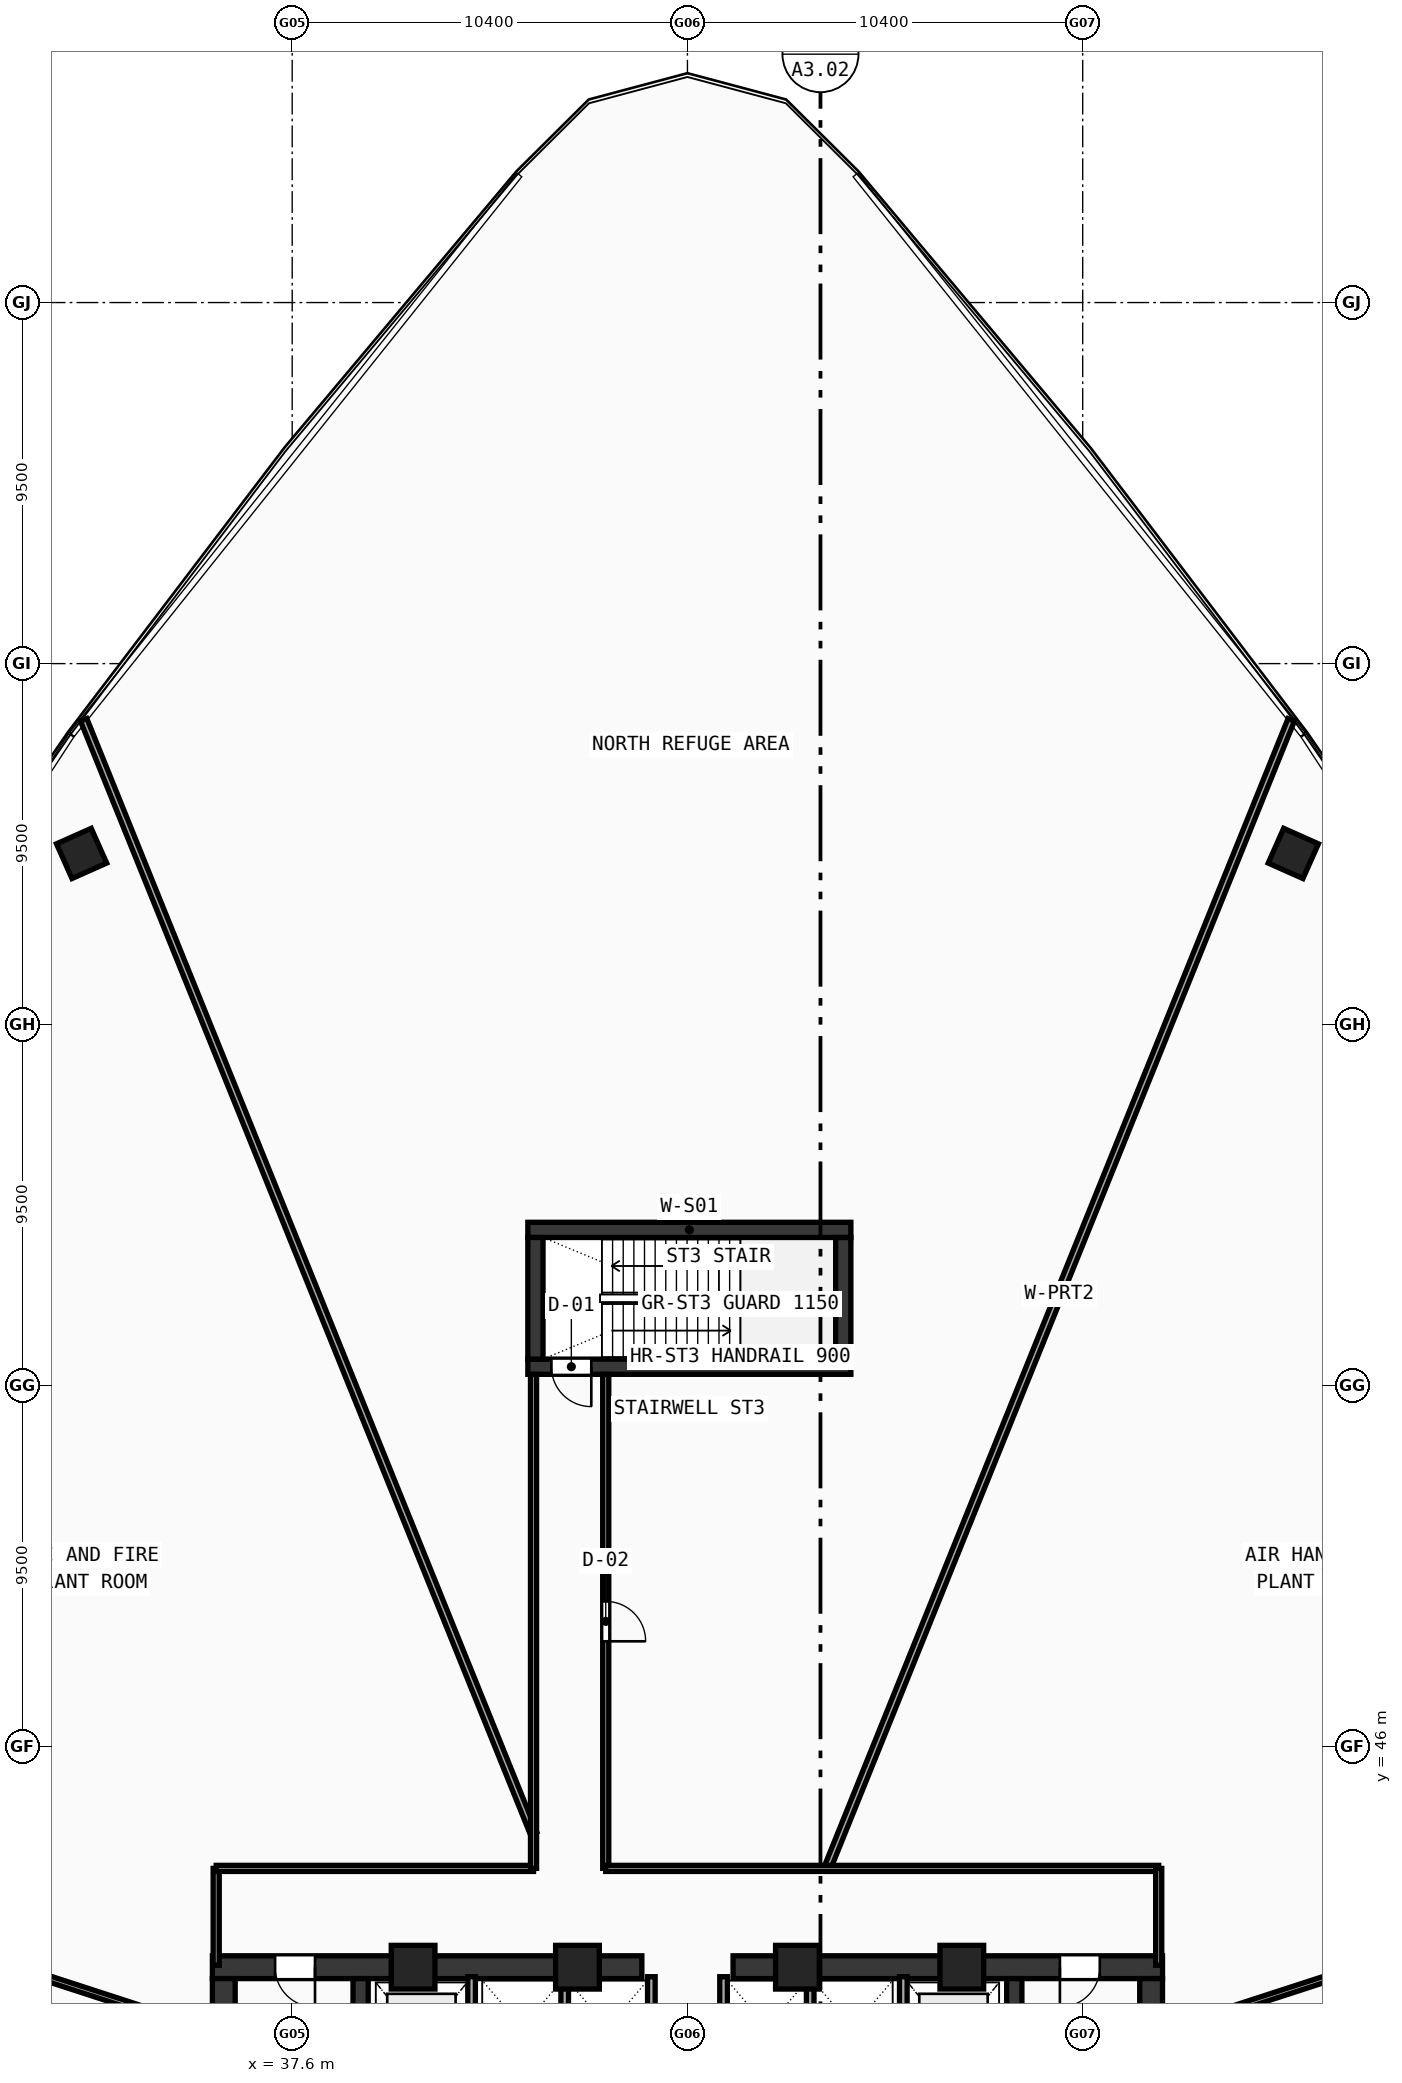
"""IFC4 building model, lengths in metres.
Left out: names, types, materials, properties, quantities, classifications, styles, units other than length and angle.
Written with IfcOpenShell. Run it as: python <this file> out.ifc"""

import sys

from ifc_helpers import new_model, si_unit, direction, frame, frame_2d, origin, origin_with_axes, origin_2d, place, context, subcontext, project, spatial, rectangle, hollow_rectangle, extrude, source, transform, mapped, element, fill, save


model = new_model("IFC4")
c1 = context("Model", 3, precision=1e-05, world=origin(), true_north=direction((0.0, 1.0)))
c2 = subcontext(c1, "Body", "Model", "MODEL_VIEW")
j1 = project(units=[si_unit("LENGTHUNIT", "METRE"), si_unit("PLANEANGLEUNIT", "RADIAN")], contexts=[c1])
p1 = place(None, origin())
s1 = spatial("IfcSite", under=j1, at=p1, CompositionType="ELEMENT")
p2 = place(p1, origin())
s2 = spatial("IfcBuilding", under=s1, at=p2, CompositionType="ELEMENT")
p3 = place(p2, frame((0.0, 0.0, 76.38)))
s3 = spatial("IfcBuildingStorey", under=s2, at=p3, CompositionType="ELEMENT", Elevation=76.38)
p4 = place(p3, frame((35.5, 40.2, 0.0), z_axis=(0.0, 0.0, 1.0), x_axis=(1.0, 0.0, 0.0)))
e1 = element("IfcWall", 1, at=p4, inside=s3, PredefinedType="SHEAR", context=c2, shape_type="SweptSolid", body=[
    extrude(rectangle(XDim=11.3, YDim=0.6, at=frame_2d((5.65, 0.0))), origin(), (0.0, 0.0, 1.0), 4.54),
])
p5 = place(p4, frame((1.65, 0.0, 0.0)))
e2 = element("IfcOpeningElement", 2, at=p5, cuts=e1, PredefinedType="OPENING", context=c2, shape_type="SweptSolid", body=[
    extrude(rectangle(XDim=1.05, YDim=2.1, at=frame_2d((0.525, 1.05))), frame((0.0, 0.31, 0.0), z_axis=(0.0, -1.0, 0.0), x_axis=(1.0, 0.0, 0.0)), (0.0, 0.0, 1.0), 0.62),
])
p6 = place(p3, frame((49.2, 40.2, 0.0), z_axis=(0.0, 0.0, 1.0), x_axis=(1.0, 0.0, 0.0)))
e3 = element("IfcWall", 3, at=p6, inside=s3, PredefinedType="SHEAR", context=c2, shape_type="SweptSolid", body=[
    extrude(rectangle(XDim=11.3, YDim=0.6, at=frame_2d((5.65, 0.0))), origin(), (0.0, 0.0, 1.0), 4.54),
])
p7 = place(p6, frame((8.6, 0.0, 0.0)))
e4 = element("IfcOpeningElement", 4, at=p7, cuts=e3, PredefinedType="OPENING", context=c2, shape_type="SweptSolid", body=[
    extrude(rectangle(XDim=1.05, YDim=2.1, at=frame_2d((0.525, 1.05))), frame((0.0, 0.31, 0.0), z_axis=(0.0, -1.0, 0.0), x_axis=(1.0, 0.0, 0.0)), (0.0, 0.0, 1.0), 0.62),
])
for number, where, z_axis, x_axis in (
    (5, (35.8, 27.8, 0.0), (0.0, 0.0, 1.0), (0.0, 1.0, 0.0)),
    (6, (60.2, 27.8, 0.0), (0.0, 0.0, 1.0), (0.0, 1.0, 0.0)),
):
    element("IfcWall", number, at=place(p3, frame(where, z_axis=z_axis, x_axis=x_axis)), inside=s3, PredefinedType="SHEAR", context=c2, shape_type="SweptSolid", body=[
        extrude(rectangle(XDim=12.1, YDim=0.6, at=frame_2d((6.05, 0.0))), origin(), (0.0, 0.0, 1.0), 4.54),
    ])
p8 = place(p3, frame((39.4, 27.8, 0.0), z_axis=(0.0, 0.0, 1.0), x_axis=(0.0, 1.0, 0.0)))
e7 = element("IfcWall", 7, at=p8, inside=s3, PredefinedType="SHEAR", context=c2, shape_type="SweptSolid", body=[
    extrude(rectangle(XDim=12.1, YDim=0.4, at=frame_2d((6.05, 0.0))), origin(), (0.0, 0.0, 1.0), 4.54),
])
p9 = place(p8, frame((9.95, 0.0, 0.0)))
e8 = element("IfcOpeningElement", 8, at=p9, cuts=e7, PredefinedType="OPENING", context=c2, shape_type="SweptSolid", body=[
    extrude(rectangle(XDim=1.1, YDim=2.1, at=frame_2d((0.55, 1.05))), frame((0.0, 0.21, 0.0), z_axis=(0.0, -1.0, 0.0), x_axis=(1.0, 0.0, 0.0)), (0.0, 0.0, 1.0), 0.42),
])
p10 = place(p3, frame((56.6, 27.8, 0.0), z_axis=(0.0, 0.0, 1.0), x_axis=(0.0, 1.0, 0.0)))
e9 = element("IfcWall", 9, at=p10, inside=s3, PredefinedType="SHEAR", context=c2, shape_type="SweptSolid", body=[
    extrude(rectangle(XDim=12.1, YDim=0.4, at=frame_2d((6.05, 0.0))), origin(), (0.0, 0.0, 1.0), 4.54),
])
p11 = place(p10, frame((9.95, 0.0, 0.0)))
e10 = element("IfcOpeningElement", 10, at=p11, cuts=e9, PredefinedType="OPENING", context=c2, shape_type="SweptSolid", body=[
    extrude(rectangle(XDim=1.1, YDim=2.1, at=frame_2d((0.55, 1.05))), frame((0.0, 0.21, 0.0), z_axis=(0.0, -1.0, 0.0), x_axis=(1.0, 0.0, 0.0)), (0.0, 0.0, 1.0), 0.42),
])
p12 = place(p3, frame((43.8, 59.6, 0.0), z_axis=(0.0, 0.0, 1.0), x_axis=(1.0, 0.0, 0.0)))
e11 = element("IfcWall", 11, at=p12, inside=s3, PredefinedType="SHEAR", context=c2, shape_type="SweptSolid", body=[
    extrude(rectangle(XDim=8.5, YDim=0.4, at=frame_2d((4.25, 0.0))), origin(), (0.0, 0.0, 1.0), 4.54),
])
p13 = place(p3, frame((43.8, 56.0, 0.0), z_axis=(0.0, 0.0, 1.0), x_axis=(1.0, 0.0, 0.0)))
e12 = element("IfcWall", 12, at=p13, inside=s3, PredefinedType="SHEAR", context=c2, shape_type="SweptSolid", body=[
    extrude(rectangle(XDim=8.5, YDim=0.4, at=frame_2d((4.25, 0.0))), origin(), (0.0, 0.0, 1.0), 4.54),
])
p14 = place(p13, frame((0.62, 0.0, 0.0)))
e13 = element("IfcOpeningElement", 13, at=p14, cuts=e12, PredefinedType="OPENING", context=c2, shape_type="SweptSolid", body=[
    extrude(rectangle(XDim=1.05, YDim=2.1, at=frame_2d((0.525, 1.05))), frame((0.0, 0.21, 0.0), z_axis=(0.0, -1.0, 0.0), x_axis=(1.0, 0.0, 0.0)), (0.0, 0.0, 1.0), 0.42),
])
for number, where, z_axis, x_axis in (
    (14, (44.0, 56.2, 0.0), (0.0, 0.0, 1.0), (0.0, 1.0, 0.0)),
    (15, (52.1, 56.2, 0.0), (0.0, 0.0, 1.0), (0.0, 1.0, 0.0)),
):
    element("IfcWall", number, at=place(p3, frame(where, z_axis=z_axis, x_axis=x_axis)), inside=s3, PredefinedType="SHEAR", context=c2, shape_type="SweptSolid", body=[
        extrude(rectangle(XDim=3.2, YDim=0.4, at=frame_2d((1.6, 0.0))), origin(), (0.0, 0.0, 1.0), 4.54),
    ])
m1 = source(origin(), c2, "Body", "SweptSolid", [
    extrude(hollow_rectangle(XDim=1.15, YDim=1.15, WallThickness=0.048, at=origin_2d()), origin(), (0.0, 0.0, 1.0), 4.82),
])
for number, where, z_axis, x_axis in (
    (16, (55.219, 40.2, -0.28), (0.0, 0.0, 1.0), (1.0, 0.0, 0.0)),
    (17, (50.894, 40.2, -0.28), (0.0, 0.0, 1.0), (1.0, 0.0, 0.0)),
    (18, (45.106, 40.2, -0.28), (0.0, 0.0, 1.0), (1.0, 0.0, 0.0)),
    (19, (40.781, 40.2, -0.28), (0.0, 0.0, 1.0), (1.0, 0.0, 0.0)),
):
    element("IfcColumn", number, at=place(p3, frame(where, z_axis=z_axis, x_axis=x_axis)), inside=s3, PredefinedType="COLUMN", context=c2, shape_type="MappedRepresentation", body=[
        mapped(m1, transform((0.0, 0.0, 0.0), scale=1.0)),
    ])
m2 = source(origin(), c2, "Body", "SweptSolid", [
    extrude(hollow_rectangle(XDim=1.0, YDim=1.0, WallThickness=0.042, at=origin_2d()), origin(), (0.0, 0.0, 1.0), 4.82),
])
for number, where, z_axis, x_axis in (
    (20, (63.941, 69.505, -0.28), (0.0, 0.0, 1.0), (-0.914, 0.407, 0.0)),
    (21, (32.059, 69.505, -0.28), (0.0, 0.0, 1.0), (-0.914, -0.407, 0.0)),
):
    element("IfcColumn", number, at=place(p3, frame(where, z_axis=z_axis, x_axis=x_axis)), inside=s3, PredefinedType="COLUMN", context=c2, shape_type="MappedRepresentation", body=[
        mapped(m2, transform((0.0, 0.0, 0.0), scale=1.0)),
    ])
p15 = place(p3, frame((42.32, 33.5, 0.0), z_axis=(0.0, 0.0, 1.0), x_axis=(0.0, 1.0, 0.0)))
e22 = element("IfcWall", 22, at=p15, inside=s3, PredefinedType="SOLIDWALL", context=c2, shape_type="SweptSolid", body=[
    extrude(rectangle(XDim=6.45, YDim=0.2, at=frame_2d((3.225, 0.0))), origin(), (0.0, 0.0, 1.0), 4.54),
])
p16 = place(p15, frame((1.0, 0.0, 0.0)))
e23 = element("IfcOpeningElement", 23, at=p16, cuts=e22, PredefinedType="OPENING", context=c2, shape_type="SweptSolid", body=[
    extrude(rectangle(XDim=1.05, YDim=2.1, at=frame_2d((0.525, 1.05))), frame((0.0, 0.11, 0.0), z_axis=(0.0, -1.0, 0.0), x_axis=(1.0, 0.0, 0.0)), (0.0, 0.0, 1.0), 0.22),
])
p17 = place(p3, frame((53.68, 36.65, 0.0), z_axis=(0.0, 0.0, 1.0), x_axis=(0.0, 1.0, 0.0)))
e24 = element("IfcWall", 24, at=p17, inside=s3, PredefinedType="SOLIDWALL", context=c2, shape_type="SweptSolid", body=[
    extrude(rectangle(XDim=3.3, YDim=0.2, at=frame_2d((1.65, 0.0))), origin(), (0.0, 0.0, 1.0), 4.54),
])
for number, where, z_axis, x_axis in (
    (25, (47.05, 37.32, 0.0), (0.0, 0.0, 1.0), (0.0, 1.0, 0.0)),
    (26, (48.95, 37.32, 0.0), (0.0, 0.0, 1.0), (0.0, 1.0, 0.0)),
    (27, (44.77, 37.32, 0.0), (0.0, 0.0, 1.0), (0.0, 1.0, 0.0)),
    (28, (51.23, 37.32, 0.0), (0.0, 0.0, 1.0), (0.0, 1.0, 0.0)),
):
    element("IfcWall", number, at=place(p3, frame(where, z_axis=z_axis, x_axis=x_axis)), inside=s3, PredefinedType="SOLIDWALL", context=c2, shape_type="SweptSolid", body=[
        extrude(rectangle(XDim=2.63, YDim=0.2, at=frame_2d((1.315, 0.0))), origin(), (0.0, 0.0, 1.0), 4.54),
    ])
p18 = place(p3, frame((60.616, 37.063, 0.0), z_axis=(0.0, 0.0, 1.0), x_axis=(0.951055634406, 0.309019708539, 0.0)))
e29 = element("IfcWall", 29, at=p18, inside=s3, PredefinedType="PARTITIONING", context=c2, shape_type="SweptSolid", body=[
    extrude(rectangle(XDim=21.711, YDim=0.16, at=frame_2d((10.856, 0.0))), origin(), (0.0, 0.0, 1.0), 3.84),
])
for number, where, z_axis, x_axis in (
    (30, (60.184, 38.395, 0.0), (0.0, 0.0, 1.0), (0.951, 0.309, 0.0)),
    (31, (35.816, 38.395, 0.0), (0.0, 0.0, 1.0), (-0.951, 0.309, 0.0)),
):
    element("IfcWall", number, at=place(p3, frame(where, z_axis=z_axis, x_axis=x_axis)), inside=s3, PredefinedType="PARTITIONING", context=c2, shape_type="SweptSolid", body=[
        extrude(rectangle(XDim=21.478, YDim=0.16, at=frame_2d((10.739, 0.0))), origin(), (0.0, 0.0, 1.0), 3.84),
    ])
p19 = place(p3, frame((35.384, 37.063, 0.0), z_axis=(0.0, 0.0, 1.0), x_axis=(-0.951055634406, 0.309019708539, 0.0)))
e32 = element("IfcWall", 32, at=p19, inside=s3, PredefinedType="PARTITIONING", context=c2, shape_type="SweptSolid", body=[
    extrude(rectangle(XDim=21.711, YDim=0.16, at=frame_2d((10.856, 0.0))), origin(), (0.0, 0.0, 1.0), 3.84),
])
p20 = place(p3, frame((51.677, 42.8, 0.0), z_axis=(0.0, 0.0, 1.0), x_axis=(0.374610544703, 0.927182258133, 0.0)))
e33 = element("IfcWall", 33, at=p20, inside=s3, PredefinedType="PARTITIONING", context=c2, shape_type="SweptSolid", body=[
    extrude(rectangle(XDim=32.594, YDim=0.18, at=frame_2d((16.297, 0.0))), origin(), (0.0, 0.0, 1.0), 3.84),
])
p21 = place(p3, frame((43.95, 43.724, 0.0), z_axis=(0.0, 0.0, 1.0), x_axis=(-0.374605616336, 0.927184249332, 0.0)))
e34 = element("IfcWall", 34, at=p21, inside=s3, PredefinedType="PARTITIONING", context=c2, shape_type="SweptSolid", body=[
    extrude(rectangle(XDim=31.598, YDim=0.18, at=frame_2d((15.799, 0.0))), origin(), (0.0, 0.0, 1.0), 3.84),
])
p22 = place(p3, frame((35.6, 40.25, 0.0), z_axis=(0.0, 0.0, 1.0), x_axis=(0.0, 1.0, 0.0)))
e35 = element("IfcWall", 35, at=p22, inside=s3, PredefinedType="PARTITIONING", context=c2, shape_type="SweptSolid", body=[
    extrude(rectangle(XDim=2.55, YDim=0.16, at=frame_2d((1.275, 0.0))), origin(), (0.0, 0.0, 1.0), 4.54),
])
p23 = place(p3, frame((35.6, 42.8, 0.0), z_axis=(0.0, 0.0, 1.0), x_axis=(1.0, 0.0, 0.0)))
e36 = element("IfcWall", 36, at=p23, inside=s3, PredefinedType="PARTITIONING", context=c2, shape_type="SweptSolid", body=[
    extrude(rectangle(XDim=8.35, YDim=0.16, at=frame_2d((4.175, 0.0))), origin(), (0.0, 0.0, 1.0), 3.84),
])
p24 = place(p3, frame((43.95, 42.8, 0.0), z_axis=(0.0, 0.0, 1.0), x_axis=(0.0, 1.0, 0.0)))
e37 = element("IfcWall", 37, at=p24, inside=s3, PredefinedType="PARTITIONING", context=c2, shape_type="SweptSolid", body=[
    extrude(rectangle(XDim=13.0, YDim=0.16, at=frame_2d((6.5, 0.0))), origin(), (0.0, 0.0, 1.0), 3.84),
])
p25 = place(p3, frame((45.85, 55.8, 0.0), z_axis=(0.0, 0.0, 1.0), x_axis=(0.0, -1.0, 0.0)))
e38 = element("IfcWall", 38, at=p25, inside=s3, PredefinedType="PARTITIONING", context=c2, shape_type="SweptSolid", body=[
    extrude(rectangle(XDim=13.0, YDim=0.16, at=frame_2d((6.5, 0.0))), origin(), (0.0, 0.0, 1.0), 4.14),
])
p26 = place(p25, frame((5.975, 0.0, 0.0)))
e39 = element("IfcOpeningElement", 39, at=p26, cuts=e38, PredefinedType="OPENING", context=c2, shape_type="SweptSolid", body=[
    extrude(rectangle(XDim=1.05, YDim=2.1, at=frame_2d((0.525, 1.05))), frame((0.0, 0.09, 0.0), z_axis=(0.0, -1.0, 0.0), x_axis=(1.0, 0.0, 0.0)), (0.0, 0.0, 1.0), 0.18),
])
p27 = place(p3, frame((45.85, 42.8, 0.0), z_axis=(0.0, 0.0, 1.0), x_axis=(1.0, 0.0, 0.0)))
e40 = element("IfcWall", 40, at=p27, inside=s3, PredefinedType="PARTITIONING", context=c2, shape_type="SweptSolid", body=[
    extrude(rectangle(XDim=14.55, YDim=0.16, at=frame_2d((7.275, 0.0))), origin(), (0.0, 0.0, 1.0), 3.84),
])
p28 = place(p3, frame((60.4, 42.8, 0.0), z_axis=(0.0, 0.0, 1.0), x_axis=(0.0, -1.0, 0.0)))
e41 = element("IfcWall", 41, at=p28, inside=s3, PredefinedType="PARTITIONING", context=c2, shape_type="SweptSolid", body=[
    extrude(rectangle(XDim=2.55, YDim=0.16, at=frame_2d((1.275, 0.0))), origin(), (0.0, 0.0, 1.0), 4.54),
])
m3 = source(origin(), c2, "Body", "SweptSolid", [
    extrude(rectangle(XDim=1.05, YDim=2.1, at=frame_2d((0.525, 1.05))), frame((0.0, 0.025, 0.0), z_axis=(0.0, -1.0, 0.0), x_axis=(1.0, 0.0, 0.0)), (0.0, 0.0, 1.0), 0.05),
])
p29 = place(p5, frame((1.05, 0.0, 0.0), z_axis=(0.0, 0.0, 1.0), x_axis=(-1.0, 0.0, 0.0)))
e42 = element("IfcDoor", 42, at=p29, inside=s3, OperationType="SINGLE_SWING_LEFT", PredefinedType="DOOR", context=c2, shape_type="MappedRepresentation", body=[
    mapped(m3, transform((0.0, 0.0, 0.0), scale=1.0)),
])
fill(e2, e42)
p30 = place(p7, frame((1.05, 0.0, 0.0), z_axis=(0.0, 0.0, 1.0), x_axis=(-1.0, 0.0, 0.0)))
e43 = element("IfcDoor", 43, at=p30, inside=s3, OperationType="SINGLE_SWING_RIGHT", PredefinedType="DOOR", context=c2, shape_type="MappedRepresentation", body=[
    mapped(m3, transform((0.0, 0.0, 0.0), scale=1.0)),
])
fill(e4, e43)
p31 = place(p14, frame((1.05, 0.0, 0.0), z_axis=(0.0, 0.0, 1.0), x_axis=(-1.0, 0.0, 0.0)))
e44 = element("IfcDoor", 44, at=p31, inside=s3, OperationType="SINGLE_SWING_LEFT", PredefinedType="DOOR", context=c2, shape_type="MappedRepresentation", body=[
    mapped(m3, transform((0.0, 0.0, 0.0), scale=1.0)),
])
fill(e13, e44)
p32 = place(p26, origin_with_axes())
e45 = element("IfcDoor", 45, at=p32, inside=s3, OperationType="SINGLE_SWING_RIGHT", PredefinedType="DOOR", context=c2, shape_type="MappedRepresentation", body=[
    mapped(m3, transform((0.0, 0.0, 0.0), scale=1.0)),
])
fill(e39, e45)
save(model, sys.argv[1])
